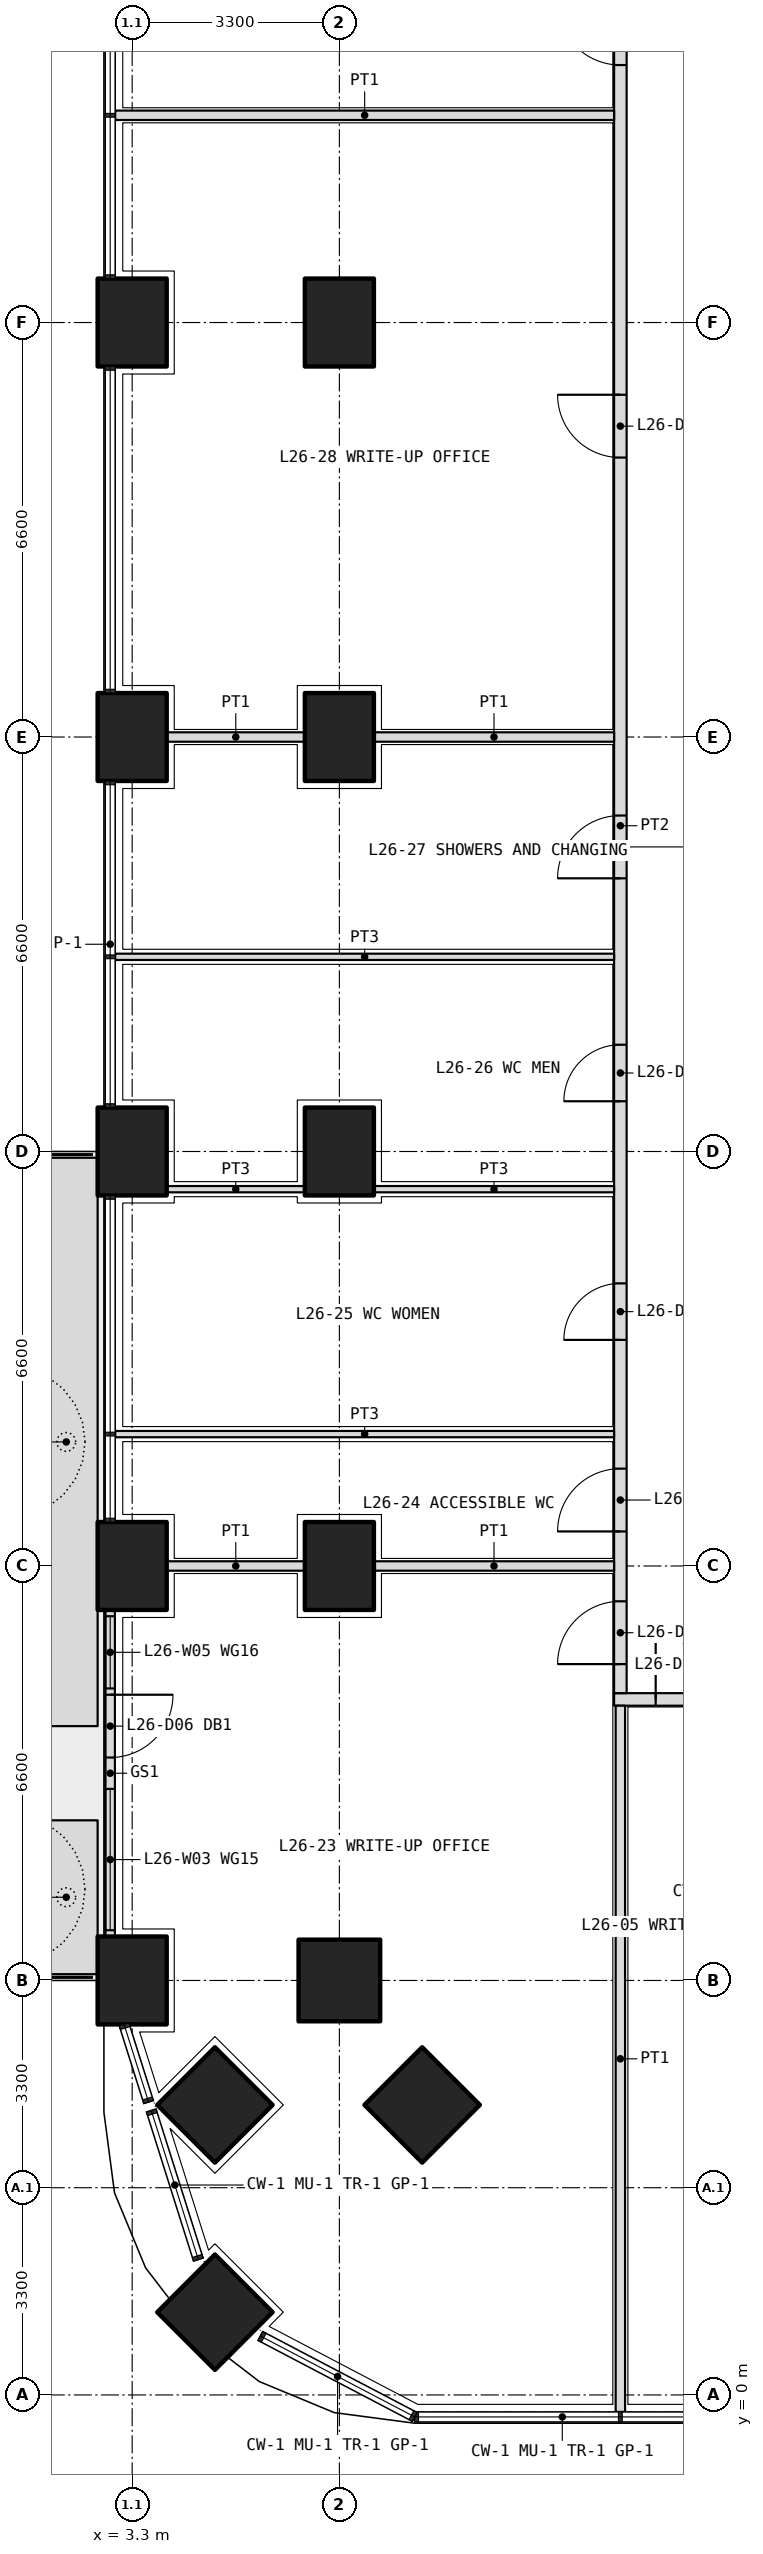
"""IFC4 building model, lengths in metres.
Left out: names, types, materials, properties, quantities, classifications, styles, units other than length and angle.
Written with IfcOpenShell. Run it as: python <this file> out.ifc"""

import sys

from ifc_helpers import new_model, si_unit, direction, frame, frame_2d, origin, origin_2d, place, context, subcontext, project, spatial, polyline, rectangle, outline, extrude, element, fill, save


model = new_model("IFC4")
c1 = context("Model", 3, precision=1e-05, world=origin(), true_north=direction((0.0, 1.0)))
c2 = subcontext(c1, "Body", "Model", "MODEL_VIEW")
j1 = project(units=[si_unit("LENGTHUNIT", "METRE"), si_unit("PLANEANGLEUNIT", "RADIAN")], contexts=[c1])
p1 = place(None, origin())
s1 = spatial("IfcSite", under=j1, at=p1, CompositionType="ELEMENT")
p2 = place(p1, origin())
s2 = spatial("IfcBuilding", under=s1, at=p2, CompositionType="ELEMENT")
p3 = place(p2, frame((0.0, 0.0, 115.8)))
s3 = spatial("IfcBuildingStorey", under=s2, at=p3, CompositionType="ELEMENT", Elevation=115.8)
p4 = place(p3, frame((4.618, 1.318, 0.0), z_axis=(0.0, 0.0, 1.0), x_axis=(0.707106781187, 0.707106781187, 0.0)))
e1 = element("IfcColumn", 1, at=p4, inside=s3, PredefinedType="COLUMN", context=c2, shape_type="SweptSolid", body=[
    extrude(rectangle(XDim=1.3, YDim=1.3, at=origin_2d()), origin(), (0.0, 0.0, 1.0), 4.2),
])
for number, where, z_axis, x_axis in (
    (2, (3.3, 6.6, 0.0), (0.0, 0.0, 1.0), (0.0, 1.0, 0.0)),
    (3, (3.3, 13.2, 0.0), (0.0, 0.0, 1.0), (0.0, 1.0, 0.0)),
    (4, (3.3, 19.8, 0.0), (0.0, 0.0, 1.0), (0.0, 1.0, 0.0)),
    (5, (3.3, 26.4, 0.0), (0.0, 0.0, 1.0), (0.0, 1.0, 0.0)),
    (6, (3.3, 33.0, 0.0), (0.0, 0.0, 1.0), (0.0, 1.0, 0.0)),
):
    element("IfcColumn", number, at=place(p3, frame(where, z_axis=z_axis, x_axis=x_axis)), inside=s3, PredefinedType="COLUMN", context=c2, shape_type="SweptSolid", body=[
        extrude(rectangle(XDim=1.4, YDim=1.1, at=origin_2d()), origin(), (0.0, 0.0, 1.0), 4.2),
    ])
for number, where, z_axis, x_axis in (
    (7, (6.6, 6.6, 0.0), (0.0, 0.0, 1.0), (1.0, 0.0, 0.0)),
    (8, (4.618, 4.618, 0.0), (0.0, 0.0, 1.0), (0.707, 0.707, 0.0)),
    (9, (7.918, 4.618, 0.0), (0.0, 0.0, 1.0), (0.707, 0.707, 0.0)),
):
    element("IfcColumn", number, at=place(p3, frame(where, z_axis=z_axis, x_axis=x_axis)), inside=s3, PredefinedType="COLUMN", context=c2, shape_type="SweptSolid", body=[
        extrude(rectangle(XDim=1.3, YDim=1.3, at=origin_2d()), origin(), (0.0, 0.0, 1.0), 4.2),
    ])
for number, where, z_axis, x_axis in (
    (10, (6.6, 13.2, 0.0), (0.0, 0.0, 1.0), (0.0, 1.0, 0.0)),
    (11, (6.6, 19.8, 0.0), (0.0, 0.0, 1.0), (0.0, 1.0, 0.0)),
    (12, (6.6, 26.4, 0.0), (0.0, 0.0, 1.0), (0.0, 1.0, 0.0)),
    (13, (6.6, 33.0, 0.0), (0.0, 0.0, 1.0), (0.0, 1.0, 0.0)),
):
    element("IfcColumn", number, at=place(p3, frame(where, z_axis=z_axis, x_axis=x_axis)), inside=s3, PredefinedType="COLUMN", context=c2, shape_type="SweptSolid", body=[
        extrude(rectangle(XDim=1.4, YDim=1.1, at=origin_2d()), origin(), (0.0, 0.0, 1.0), 4.2),
    ])
p5 = place(p3, origin())
e14 = element("IfcWall", 14, at=p5, inside=s3, PredefinedType="USERDEFINED", context=c2, shape_type="SweptSolid", body=[
    extrude(outline(polyline([(1.75, 6.7), (2.75, 6.7), (2.75, 9.15), (1.75, 9.15), (1.75, 6.7)]), holes=[polyline([(1.9, 6.85), (2.6, 6.85), (2.6, 9.0), (1.9, 9.0), (1.9, 6.85)])]), origin(), (0.0, 0.0, 1.0), 1.05),
])
p6 = place(p3, origin())
e15 = element("IfcWall", 15, at=p6, inside=s3, PredefinedType="USERDEFINED", context=c2, shape_type="SweptSolid", body=[
    extrude(outline(polyline([(1.75, 10.65), (2.75, 10.65), (2.75, 19.7), (1.75, 19.7), (1.75, 10.65)]), holes=[polyline([(1.9, 10.8), (2.6, 10.8), (2.6, 19.55), (1.9, 19.55), (1.9, 10.8)])]), origin(), (0.0, 0.0, 1.0), 1.05),
])
p7 = place(p3, frame((2.95, 12.5, 0.0), z_axis=(0.0, 0.0, 1.0), x_axis=(0.0, -1.0, 0.0)))
e16 = element("IfcWall", 16, at=p7, inside=s3, PredefinedType="SOLIDWALL", context=c2, shape_type="SweptSolid", body=[
    extrude(rectangle(XDim=5.2, YDim=0.15, at=frame_2d((2.6, 0.0))), origin(), (0.0, 0.0, 1.0), 2.7),
])
p8 = place(p7, frame((1.35, 0.0, 0.0)))
e17 = element("IfcOpeningElement", 17, at=p8, cuts=e16, PredefinedType="OPENING", context=c2, shape_type="SweptSolid", body=[
    extrude(rectangle(XDim=1.0, YDim=2.4, at=frame_2d((0.5, 1.2))), frame((0.0, 0.085, 0.0), z_axis=(0.0, -1.0, 0.0), x_axis=(1.0, 0.0, 0.0)), (0.0, 0.0, 1.0), 0.17),
])
p9 = place(p7, frame((0.1, 0.0, 0.1)))
e18 = element("IfcOpeningElement", 18, at=p9, cuts=e16, PredefinedType="OPENING", context=c2, shape_type="SweptSolid", body=[
    extrude(rectangle(XDim=1.15, YDim=2.3, at=frame_2d((0.575, 1.15))), frame((0.0, 0.085, 0.0), z_axis=(0.0, -1.0, 0.0), x_axis=(1.0, 0.0, 0.0)), (0.0, 0.0, 1.0), 0.17),
])
p10 = place(p7, frame((2.85, 0.0, 0.1)))
e19 = element("IfcOpeningElement", 19, at=p10, cuts=e16, PredefinedType="OPENING", context=c2, shape_type="SweptSolid", body=[
    extrude(rectangle(XDim=2.25, YDim=2.3, at=frame_2d((1.125, 1.15))), frame((0.0, 0.085, 0.0), z_axis=(0.0, -1.0, 0.0), x_axis=(1.0, 0.0, 0.0)), (0.0, 0.0, 1.0), 0.17),
])
p11 = place(p3, frame((10.975, 11.075, 0.0), z_axis=(0.0, 0.0, 1.0), x_axis=(1.0, 0.0, 0.0)))
e20 = element("IfcWall", 20, at=p11, inside=s3, PredefinedType="PARTITIONING", context=c2, shape_type="SweptSolid", body=[
    extrude(rectangle(XDim=12.125, YDim=0.2, at=frame_2d((6.062, 0.0))), origin(), (0.0, 0.0, 1.0), 2.85),
])
p12 = place(p11, frame((0.663, 0.0, 0.0)))
e21 = element("IfcOpeningElement", 21, at=p12, cuts=e20, PredefinedType="OPENING", context=c2, shape_type="SweptSolid", body=[
    extrude(rectangle(XDim=1.0, YDim=2.1, at=frame_2d((0.5, 1.05))), frame((0.0, 0.11, 0.0), z_axis=(0.0, -1.0, 0.0), x_axis=(1.0, 0.0, 0.0)), (0.0, 0.0, 1.0), 0.22),
])
p13 = place(p11, frame((6.675, 0.0, 0.0)))
e22 = element("IfcOpeningElement", 22, at=p13, cuts=e20, PredefinedType="OPENING", context=c2, shape_type="SweptSolid", body=[
    extrude(rectangle(XDim=1.0, YDim=2.1, at=frame_2d((0.5, 1.05))), frame((0.0, 0.11, 0.0), z_axis=(0.0, -1.0, 0.0), x_axis=(1.0, 0.0, 0.0)), (0.0, 0.0, 1.0), 0.22),
])
p14 = place(p3, frame((11.075, 11.175, 0.0), z_axis=(0.0, 0.0, 1.0), x_axis=(0.0, 1.0, 0.0)))
e23 = element("IfcWall", 23, at=p14, inside=s3, PredefinedType="PARTITIONING", context=c2, shape_type="SweptSolid", body=[
    extrude(rectangle(XDim=27.625, YDim=0.2, at=frame_2d((13.812, 0.0))), origin(), (0.0, 0.0, 1.0), 2.85),
])
p15 = place(p14, frame((0.462, 0.0, 0.0)))
e24 = element("IfcOpeningElement", 24, at=p15, cuts=e23, PredefinedType="OPENING", context=c2, shape_type="SweptSolid", body=[
    extrude(rectangle(XDim=1.0, YDim=2.1, at=frame_2d((0.5, 1.05))), frame((0.0, 0.11, 0.0), z_axis=(0.0, -1.0, 0.0), x_axis=(1.0, 0.0, 0.0)), (0.0, 0.0, 1.0), 0.22),
])
p16 = place(p14, frame((2.575, 0.0, 0.0)))
e25 = element("IfcOpeningElement", 25, at=p16, cuts=e23, PredefinedType="OPENING", context=c2, shape_type="SweptSolid", body=[
    extrude(rectangle(XDim=1.0, YDim=2.1, at=frame_2d((0.5, 1.05))), frame((0.0, 0.11, 0.0), z_axis=(0.0, -1.0, 0.0), x_axis=(1.0, 0.0, 0.0)), (0.0, 0.0, 1.0), 0.22),
])
p17 = place(p14, frame((5.625, 0.0, 0.0)))
e26 = element("IfcOpeningElement", 26, at=p17, cuts=e23, PredefinedType="OPENING", context=c2, shape_type="SweptSolid", body=[
    extrude(rectangle(XDim=0.9, YDim=2.1, at=frame_2d((0.45, 1.05))), frame((0.0, 0.11, 0.0), z_axis=(0.0, -1.0, 0.0), x_axis=(1.0, 0.0, 0.0)), (0.0, 0.0, 1.0), 0.22),
])
p18 = place(p14, frame((9.425, 0.0, 0.0)))
e27 = element("IfcOpeningElement", 27, at=p18, cuts=e23, PredefinedType="OPENING", context=c2, shape_type="SweptSolid", body=[
    extrude(rectangle(XDim=0.9, YDim=2.1, at=frame_2d((0.45, 1.05))), frame((0.0, 0.11, 0.0), z_axis=(0.0, -1.0, 0.0), x_axis=(1.0, 0.0, 0.0)), (0.0, 0.0, 1.0), 0.22),
])
p19 = place(p14, frame((12.975, 0.0, 0.0)))
e28 = element("IfcOpeningElement", 28, at=p19, cuts=e23, PredefinedType="OPENING", context=c2, shape_type="SweptSolid", body=[
    extrude(rectangle(XDim=1.0, YDim=2.1, at=frame_2d((0.5, 1.05))), frame((0.0, 0.11, 0.0), z_axis=(0.0, -1.0, 0.0), x_axis=(1.0, 0.0, 0.0)), (0.0, 0.0, 1.0), 0.22),
])
p20 = place(p14, frame((19.675, 0.0, 0.0)))
e29 = element("IfcOpeningElement", 29, at=p20, cuts=e23, PredefinedType="OPENING", context=c2, shape_type="SweptSolid", body=[
    extrude(rectangle(XDim=1.0, YDim=2.1, at=frame_2d((0.5, 1.05))), frame((0.0, 0.11, 0.0), z_axis=(0.0, -1.0, 0.0), x_axis=(1.0, 0.0, 0.0)), (0.0, 0.0, 1.0), 0.22),
])
p21 = place(p14, frame((25.925, 0.0, 0.0)))
e30 = element("IfcOpeningElement", 30, at=p21, cuts=e23, PredefinedType="OPENING", context=c2, shape_type="SweptSolid", body=[
    extrude(rectangle(XDim=1.0, YDim=2.1, at=frame_2d((0.5, 1.05))), frame((0.0, 0.11, 0.0), z_axis=(0.0, -1.0, 0.0), x_axis=(1.0, 0.0, 0.0)), (0.0, 0.0, 1.0), 0.22),
])
p22 = place(p3, frame((11.075, -0.27, 0.0), z_axis=(0.0, 0.0, 1.0), x_axis=(0.0, 1.0, 0.0)))
e31 = element("IfcWall", 31, at=p22, inside=s3, PredefinedType="PARTITIONING", context=c2, shape_type="SweptSolid", body=[
    extrude(rectangle(XDim=11.245, YDim=0.15, at=frame_2d((5.623, 0.0))), origin(), (0.0, 0.0, 1.0), 2.7),
])
p23 = place(p3, frame((3.03, 15.3, 0.0), z_axis=(0.0, 0.0, 1.0), x_axis=(1.0, 0.0, 0.0)))
e32 = element("IfcWall", 32, at=p23, inside=s3, PredefinedType="PARTITIONING", context=c2, shape_type="SweptSolid", body=[
    extrude(rectangle(XDim=7.945, YDim=0.1, at=frame_2d((3.973, 0.0))), origin(), (0.0, 0.0, 1.0), 2.7),
])
p24 = place(p3, frame((3.85, 19.2, 0.0), z_axis=(0.0, 0.0, 1.0), x_axis=(1.0, 0.0, 0.0)))
e33 = element("IfcWall", 33, at=p24, inside=s3, PredefinedType="PARTITIONING", context=c2, shape_type="SweptSolid", body=[
    extrude(rectangle(XDim=2.2, YDim=0.1, at=frame_2d((1.1, 0.0))), origin(), (0.0, 0.0, 1.0), 2.85),
])
p25 = place(p3, frame((7.15, 19.2, 0.0), z_axis=(0.0, 0.0, 1.0), x_axis=(1.0, 0.0, 0.0)))
e34 = element("IfcWall", 34, at=p25, inside=s3, PredefinedType="PARTITIONING", context=c2, shape_type="SweptSolid", body=[
    extrude(rectangle(XDim=3.825, YDim=0.1, at=frame_2d((1.913, 0.0))), origin(), (0.0, 0.0, 1.0), 2.85),
])
p26 = place(p3, frame((3.03, 22.9, 0.0), z_axis=(0.0, 0.0, 1.0), x_axis=(1.0, 0.0, 0.0)))
e35 = element("IfcWall", 35, at=p26, inside=s3, PredefinedType="PARTITIONING", context=c2, shape_type="SweptSolid", body=[
    extrude(rectangle(XDim=7.945, YDim=0.1, at=frame_2d((3.973, 0.0))), origin(), (0.0, 0.0, 1.0), 2.7),
])
p27 = place(p3, frame((3.85, 13.2, 0.0), z_axis=(0.0, 0.0, 1.0), x_axis=(1.0, 0.0, 0.0)))
e36 = element("IfcWall", 36, at=p27, inside=s3, PredefinedType="PARTITIONING", context=c2, shape_type="SweptSolid", body=[
    extrude(rectangle(XDim=2.2, YDim=0.15, at=frame_2d((1.1, 0.0))), origin(), (0.0, 0.0, 1.0), 2.85),
])
p28 = place(p3, frame((7.15, 13.2, 0.0), z_axis=(0.0, 0.0, 1.0), x_axis=(1.0, 0.0, 0.0)))
e37 = element("IfcWall", 37, at=p28, inside=s3, PredefinedType="PARTITIONING", context=c2, shape_type="SweptSolid", body=[
    extrude(rectangle(XDim=3.825, YDim=0.15, at=frame_2d((1.913, 0.0))), origin(), (0.0, 0.0, 1.0), 2.85),
])
p29 = place(p3, frame((3.85, 26.4, 0.0), z_axis=(0.0, 0.0, 1.0), x_axis=(1.0, 0.0, 0.0)))
e38 = element("IfcWall", 38, at=p29, inside=s3, PredefinedType="PARTITIONING", context=c2, shape_type="SweptSolid", body=[
    extrude(rectangle(XDim=2.2, YDim=0.15, at=frame_2d((1.1, 0.0))), origin(), (0.0, 0.0, 1.0), 2.85),
])
p30 = place(p3, frame((7.15, 26.4, 0.0), z_axis=(0.0, 0.0, 1.0), x_axis=(1.0, 0.0, 0.0)))
e39 = element("IfcWall", 39, at=p30, inside=s3, PredefinedType="PARTITIONING", context=c2, shape_type="SweptSolid", body=[
    extrude(rectangle(XDim=3.825, YDim=0.15, at=frame_2d((1.913, 0.0))), origin(), (0.0, 0.0, 1.0), 2.85),
])
p31 = place(p3, frame((3.03, 36.3, 0.0), z_axis=(0.0, 0.0, 1.0), x_axis=(1.0, 0.0, 0.0)))
e40 = element("IfcWall", 40, at=p31, inside=s3, PredefinedType="PARTITIONING", context=c2, shape_type="SweptSolid", body=[
    extrude(rectangle(XDim=7.945, YDim=0.15, at=frame_2d((3.973, 0.0))), origin(), (0.0, 0.0, 1.0), 2.7),
])
p32 = place(p8, origin())
e41 = element("IfcDoor", 41, at=p32, inside=s3, OperationType="SINGLE_SWING_LEFT", PredefinedType="DOOR", context=c2, shape_type="SweptSolid", body=[
    extrude(rectangle(XDim=1.0, YDim=2.4, at=frame_2d((0.5, 1.2))), frame((0.0, 0.025, 0.0), z_axis=(0.0, -1.0, 0.0), x_axis=(1.0, 0.0, 0.0)), (0.0, 0.0, 1.0), 0.05),
])
fill(e17, e41)
p33 = place(p9, origin())
e42 = element("IfcWindow", 42, at=p33, inside=s3, PartitioningType="SINGLE_PANEL", PredefinedType="WINDOW", context=c2, shape_type="SweptSolid", body=[
    extrude(rectangle(XDim=1.15, YDim=2.3, at=frame_2d((0.575, 1.15))), frame((0.0, 0.03, 0.0), z_axis=(0.0, -1.0, 0.0), x_axis=(1.0, 0.0, 0.0)), (0.0, 0.0, 1.0), 0.06),
])
fill(e18, e42)
p34 = place(p10, origin())
e43 = element("IfcWindow", 43, at=p34, inside=s3, PartitioningType="SINGLE_PANEL", PredefinedType="WINDOW", context=c2, shape_type="SweptSolid", body=[
    extrude(rectangle(XDim=2.25, YDim=2.3, at=frame_2d((1.125, 1.15))), frame((0.0, 0.03, 0.0), z_axis=(0.0, -1.0, 0.0), x_axis=(1.0, 0.0, 0.0)), (0.0, 0.0, 1.0), 0.06),
])
fill(e19, e43)
p35 = place(p12, origin())
e44 = element("IfcDoor", 44, at=p35, inside=s3, OperationType="SINGLE_SWING_LEFT", PredefinedType="DOOR", context=c2, shape_type="SweptSolid", body=[
    extrude(rectangle(XDim=1.0, YDim=2.1, at=frame_2d((0.5, 1.05))), frame((0.0, 0.025, 0.0), z_axis=(0.0, -1.0, 0.0), x_axis=(1.0, 0.0, 0.0)), (0.0, 0.0, 1.0), 0.05),
])
fill(e21, e44)
p36 = place(p15, origin())
e45 = element("IfcDoor", 45, at=p36, inside=s3, OperationType="SINGLE_SWING_LEFT", PredefinedType="DOOR", context=c2, shape_type="SweptSolid", body=[
    extrude(rectangle(XDim=1.0, YDim=2.1, at=frame_2d((0.5, 1.05))), frame((0.0, 0.025, 0.0), z_axis=(0.0, -1.0, 0.0), x_axis=(1.0, 0.0, 0.0)), (0.0, 0.0, 1.0), 0.05),
])
fill(e24, e45)
p37 = place(p16, origin())
e46 = element("IfcDoor", 46, at=p37, inside=s3, OperationType="SINGLE_SWING_LEFT", PredefinedType="DOOR", context=c2, shape_type="SweptSolid", body=[
    extrude(rectangle(XDim=1.0, YDim=2.1, at=frame_2d((0.5, 1.05))), frame((0.0, 0.025, 0.0), z_axis=(0.0, -1.0, 0.0), x_axis=(1.0, 0.0, 0.0)), (0.0, 0.0, 1.0), 0.05),
])
fill(e25, e46)
p38 = place(p17, origin())
e47 = element("IfcDoor", 47, at=p38, inside=s3, OperationType="SINGLE_SWING_LEFT", PredefinedType="DOOR", context=c2, shape_type="SweptSolid", body=[
    extrude(rectangle(XDim=0.9, YDim=2.1, at=frame_2d((0.45, 1.05))), frame((0.0, 0.025, 0.0), z_axis=(0.0, -1.0, 0.0), x_axis=(1.0, 0.0, 0.0)), (0.0, 0.0, 1.0), 0.05),
])
fill(e26, e47)
p39 = place(p18, origin())
e48 = element("IfcDoor", 48, at=p39, inside=s3, OperationType="SINGLE_SWING_LEFT", PredefinedType="DOOR", context=c2, shape_type="SweptSolid", body=[
    extrude(rectangle(XDim=0.9, YDim=2.1, at=frame_2d((0.45, 1.05))), frame((0.0, 0.025, 0.0), z_axis=(0.0, -1.0, 0.0), x_axis=(1.0, 0.0, 0.0)), (0.0, 0.0, 1.0), 0.05),
])
fill(e27, e48)
p40 = place(p19, origin())
e49 = element("IfcDoor", 49, at=p40, inside=s3, OperationType="SINGLE_SWING_LEFT", PredefinedType="DOOR", context=c2, shape_type="SweptSolid", body=[
    extrude(rectangle(XDim=1.0, YDim=2.1, at=frame_2d((0.5, 1.05))), frame((0.0, 0.025, 0.0), z_axis=(0.0, -1.0, 0.0), x_axis=(1.0, 0.0, 0.0)), (0.0, 0.0, 1.0), 0.05),
])
fill(e28, e49)
p41 = place(p20, origin())
e50 = element("IfcDoor", 50, at=p41, inside=s3, OperationType="SINGLE_SWING_RIGHT", PredefinedType="DOOR", context=c2, shape_type="SweptSolid", body=[
    extrude(rectangle(XDim=1.0, YDim=2.1, at=frame_2d((0.5, 1.05))), frame((0.0, 0.025, 0.0), z_axis=(0.0, -1.0, 0.0), x_axis=(1.0, 0.0, 0.0)), (0.0, 0.0, 1.0), 0.05),
])
fill(e29, e50)
p42 = place(p21, origin())
e51 = element("IfcDoor", 51, at=p42, inside=s3, OperationType="SINGLE_SWING_RIGHT", PredefinedType="DOOR", context=c2, shape_type="SweptSolid", body=[
    extrude(rectangle(XDim=1.0, YDim=2.1, at=frame_2d((0.5, 1.05))), frame((0.0, 0.025, 0.0), z_axis=(0.0, -1.0, 0.0), x_axis=(1.0, 0.0, 0.0)), (0.0, 0.0, 1.0), 0.05),
])
fill(e30, e51)
save(model, sys.argv[1])
